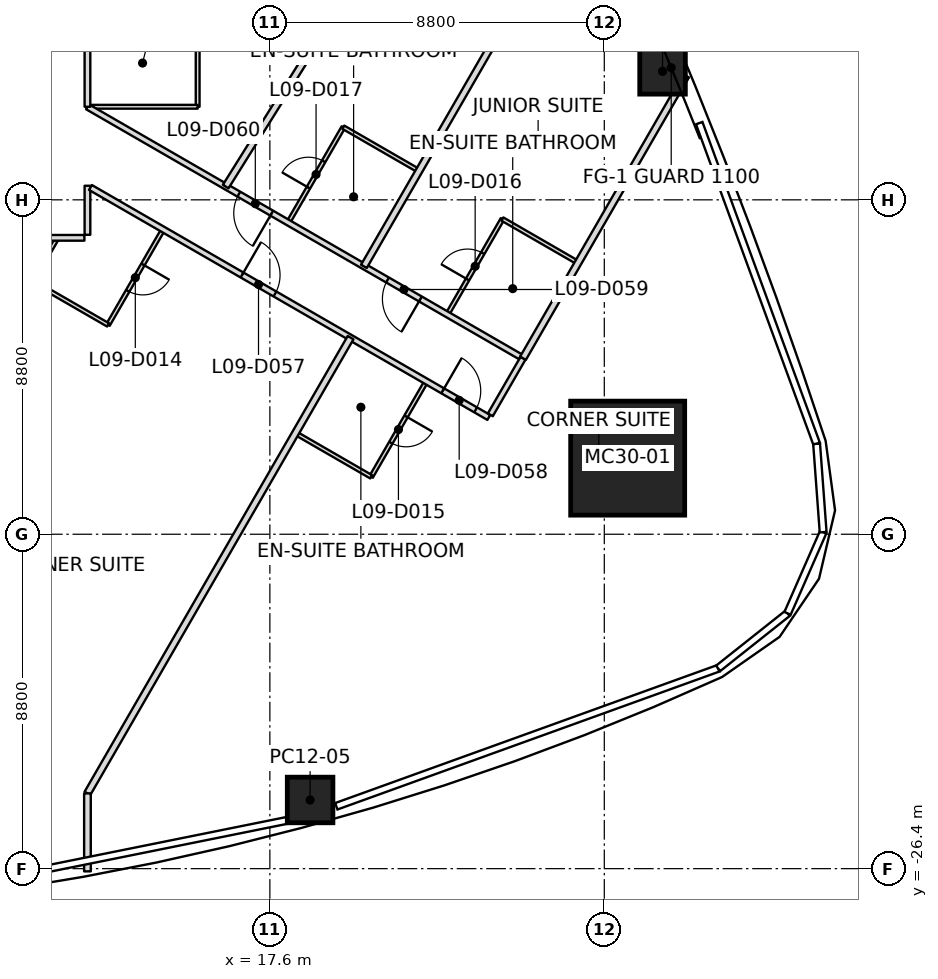
"""IFC4 building model, lengths in metres.
Left out: names, types, materials, properties, quantities, classifications, styles, units other than length and angle.
Written with IfcOpenShell. Run it as: python <this file> out.ifc"""

import sys

from ifc_helpers import new_model, si_unit, direction, frame, frame_2d, origin, origin_2d, place, context, subcontext, project, spatial, rectangle, extrude, clip, halfspace, element, fill, save


model = new_model("IFC4")
c1 = context("Model", 3, precision=1e-05, world=origin(), true_north=direction((0.0, 1.0)))
c2 = subcontext(c1, "Body", "Model", "MODEL_VIEW")
j1 = project(units=[si_unit("LENGTHUNIT", "METRE"), si_unit("PLANEANGLEUNIT", "RADIAN")], contexts=[c1])
p1 = place(None, origin())
s1 = spatial("IfcSite", under=j1, at=p1, CompositionType="ELEMENT")
p2 = place(p1, origin())
s2 = spatial("IfcBuilding", under=s1, at=p2, CompositionType="ELEMENT")
p3 = place(p2, frame((0.0, 0.0, 55.4)))
s3 = spatial("IfcBuildingStorey", under=s2, at=p3, CompositionType="ELEMENT", Elevation=55.4)
p4 = place(p3, frame((27.015, -15.597, 0.0), z_axis=(-0.030595822255, 0.017671724923, 0.999375607967), x_axis=(0.999531838243, 0.000540934199, 0.030591040022)))
e1 = element("IfcColumn", 1, at=p4, inside=s3, PredefinedType="COLUMN", context=c2, shape_type="SweptSolid", body=[
    extrude(rectangle(XDim=3.0, YDim=3.0, at=origin_2d()), origin(), (0.0, 0.0, 1.0), 3.702),
])
p5 = place(p3, frame((18.659, -24.593, 0.0), z_axis=(-0.018962740175, 0.175794991964, 0.984244144146), x_axis=(0.964231408406, 0.26352619053, -0.028491015209)))
e2 = element("IfcColumn", 2, at=p5, inside=s3, PredefinedType="COLUMN", context=c2, shape_type="SweptSolid", body=[
    clip(clip(extrude(rectangle(XDim=1.2, YDim=1.2, at=origin_2d()), origin(), (0.0, 0.0, 1.0), 3.76), halfspace(frame((0.0, 0.0, 0.001)), True)), halfspace(frame((0.0, 0.0, 3.759)), False)),
])
p6 = place(p3, frame((27.933, -5.418, 0.0), z_axis=(-0.019459371732, 0.011015983319, 0.999749959221), x_axis=(-0.381749906574, 0.924097828084, -0.017612863535)))
e3 = element("IfcColumn", 3, at=p6, inside=s3, PredefinedType="COLUMN", context=c2, shape_type="SweptSolid", body=[
    extrude(rectangle(XDim=1.2, YDim=1.2, at=origin_2d()), origin(), (0.0, 0.0, 1.0), 3.701),
])
p7 = place(p3, frame((19.724, -12.427, 0.0), z_axis=(0.0, 0.0, 1.0), x_axis=(-0.499994112739, -0.866028802769, 0.0)))
e4 = element("IfcWall", 4, at=p7, inside=s3, PredefinedType="PARTITIONING", context=c2, shape_type="SweptSolid", body=[
    extrude(rectangle(XDim=13.847, YDim=0.175, at=frame_2d((6.924, 0.0))), origin(), (0.0, 0.0, 1.0), 2.797),
])
p8 = place(p3, frame((12.8, -24.419, 0.0), z_axis=(0.0, 0.0, 1.0), x_axis=(0.0, -1.0, 0.0)))
e5 = element("IfcWall", 5, at=p8, inside=s3, PredefinedType="PARTITIONING", context=c2, shape_type="SweptSolid", body=[
    extrude(rectangle(XDim=2.052, YDim=0.175, at=frame_2d((1.026, 0.0))), origin(), (0.0, 0.0, 1.0), 2.934),
])
p9 = place(p3, frame((24.065, 3.75, 0.0), z_axis=(0.0, 0.0, 1.0), x_axis=(-0.530143821716, -0.847907735721, 0.0)))
e6 = element("IfcWall", 6, at=p9, inside=s3, PredefinedType="PARTITIONING", context=c2, shape_type="SweptSolid", body=[
    extrude(rectangle(XDim=14.389, YDim=0.175, at=frame_2d((7.194, 0.0))), origin(), (0.0, 0.0, 1.0), 2.947),
])
p10 = place(p3, frame((20.075, -10.551, 0.0), z_axis=(0.0, 0.0, 1.0), x_axis=(0.500001190589, 0.866024716396, 0.0)))
e7 = element("IfcWall", 7, at=p10, inside=s3, PredefinedType="PARTITIONING", context=c2, shape_type="SweptSolid", body=[
    extrude(rectangle(XDim=12.156, YDim=0.175, at=frame_2d((6.078, 0.0))), origin(), (0.0, 0.0, 1.0), 2.934),
])
p11 = place(p3, frame((24.261, -12.968, 0.0), z_axis=(0.0, 0.0, 1.0), x_axis=(0.500006467099, 0.866021669971, 0.0)))
e8 = element("IfcWall", 8, at=p11, inside=s3, PredefinedType="PARTITIONING", context=c2, shape_type="SweptSolid", body=[
    extrude(rectangle(XDim=8.582, YDim=0.175, at=frame_2d((4.291, 0.0))), origin(), (0.0, 0.0, 1.0), 2.934),
])
p12 = place(p3, frame((-12.72, -9.8, 0.0), z_axis=(0.0, 0.0, 1.0), x_axis=(1.0, 0.0, 0.0)))
e9 = element("IfcWall", 9, at=p12, inside=s3, PredefinedType="PARTITIONING", context=c2, shape_type="SweptSolid", body=[
    extrude(rectangle(XDim=25.44, YDim=0.15, at=frame_2d((12.72, 0.0))), origin(), (0.0, 0.0, 1.0), 2.797),
])
p13 = place(p12, frame((7.32, 0.0, 0.0)))
e10 = element("IfcOpeningElement", 10, at=p13, cuts=e9, PredefinedType="OPENING", context=c2, shape_type="SweptSolid", body=[
    extrude(rectangle(XDim=1.0, YDim=2.1, at=frame_2d((0.5, 1.05))), frame((0.0, 0.075, 0.0), z_axis=(0.0, -1.0, 0.0), x_axis=(1.0, 0.0, 0.0)), (0.0, 0.0, 1.0), 0.15),
])
p14 = place(p12, frame((11.52, 0.0, 0.0)))
e11 = element("IfcOpeningElement", 11, at=p14, cuts=e9, PredefinedType="OPENING", context=c2, shape_type="SweptSolid", body=[
    extrude(rectangle(XDim=1.0, YDim=2.1, at=frame_2d((0.5, 1.05))), frame((0.0, 0.075, 0.0), z_axis=(0.0, -1.0, 0.0), x_axis=(1.0, 0.0, 0.0)), (0.0, 0.0, 1.0), 0.15),
])
p15 = place(p12, frame((15.72, 0.0, 0.0)))
e12 = element("IfcOpeningElement", 12, at=p15, cuts=e9, PredefinedType="OPENING", context=c2, shape_type="SweptSolid", body=[
    extrude(rectangle(XDim=1.0, YDim=2.1, at=frame_2d((0.5, 1.05))), frame((0.0, 0.075, 0.0), z_axis=(0.0, -1.0, 0.0), x_axis=(1.0, 0.0, 0.0)), (0.0, 0.0, 1.0), 0.15),
])
p16 = place(p12, frame((19.92, 0.0, 0.0)))
e13 = element("IfcOpeningElement", 13, at=p16, cuts=e9, PredefinedType="OPENING", context=c2, shape_type="SweptSolid", body=[
    extrude(rectangle(XDim=1.0, YDim=2.1, at=frame_2d((0.5, 1.05))), frame((0.0, 0.075, 0.0), z_axis=(0.0, -1.0, 0.0), x_axis=(1.0, 0.0, 0.0)), (0.0, 0.0, 1.0), 0.15),
])
p17 = place(p3, frame((12.8, -9.72, 0.0), z_axis=(0.0, 0.0, 1.0), x_axis=(0.0, 1.0, 0.0)))
e14 = element("IfcWall", 14, at=p17, inside=s3, PredefinedType="PARTITIONING", context=c2, shape_type="SweptSolid", body=[
    extrude(rectangle(XDim=1.291, YDim=0.15, at=frame_2d((0.646, 0.0))), origin(), (0.0, 0.0, 1.0), 2.797),
])
p18 = place(p3, frame((12.879, -8.475, 0.0), z_axis=(0.0, 0.0, 1.0), x_axis=(0.866028715104, -0.499994264582, 0.0)))
e15 = element("IfcWall", 15, at=p18, inside=s3, PredefinedType="PARTITIONING", context=c2, shape_type="SweptSolid", body=[
    extrude(rectangle(XDim=12.103, YDim=0.15, at=frame_2d((6.052, 0.0))), origin(), (0.0, 0.0, 1.0), 2.797),
])
p19 = place(p18, frame((4.606, 0.0, 0.0)))
e16 = element("IfcOpeningElement", 16, at=p19, cuts=e15, PredefinedType="OPENING", context=c2, shape_type="SweptSolid", body=[
    extrude(rectangle(XDim=1.0, YDim=2.1, at=frame_2d((0.5, 1.05))), frame((0.0, 0.075, 0.0), z_axis=(0.0, -1.0, 0.0), x_axis=(1.0, 0.0, 0.0)), (0.0, 0.0, 1.0), 0.15),
])
p20 = place(p18, frame((10.703, 0.0, 0.0)))
e17 = element("IfcOpeningElement", 17, at=p20, cuts=e15, PredefinedType="OPENING", context=c2, shape_type="SweptSolid", body=[
    extrude(rectangle(XDim=1.0, YDim=2.1, at=frame_2d((0.5, 1.05))), frame((0.0, 0.075, 0.0), z_axis=(0.0, -1.0, 0.0), x_axis=(1.0, 0.0, 0.0)), (0.0, 0.0, 1.0), 0.15),
])
p21 = place(p3, frame((23.401, -14.458, 0.0), z_axis=(0.0, 0.0, 1.0), x_axis=(0.500062383118, 0.865989383878, 0.0)))
e18 = element("IfcWall", 18, at=p21, inside=s3, PredefinedType="PARTITIONING", context=c2, shape_type="SweptSolid", body=[
    extrude(rectangle(XDim=1.72, YDim=0.15, at=frame_2d((0.86, 0.0))), origin(), (0.0, 0.0, 1.0), 2.797),
])
p22 = place(p3, frame((24.192, -12.928, 0.0), z_axis=(0.0, 0.0, 1.0), x_axis=(-0.866018681408, 0.500011643316, 0.0)))
e19 = element("IfcWall", 19, at=p22, inside=s3, PredefinedType="PARTITIONING", context=c2, shape_type="SweptSolid", body=[
    extrude(rectangle(XDim=13.154, YDim=0.15, at=frame_2d((6.577, 0.0))), origin(), (0.0, 0.0, 1.0), 2.947),
])
p23 = place(p22, frame((3.037, 0.0, 0.0)))
e20 = element("IfcOpeningElement", 20, at=p23, cuts=e19, PredefinedType="OPENING", context=c2, shape_type="SweptSolid", body=[
    extrude(rectangle(XDim=1.0, YDim=2.1, at=frame_2d((0.5, 1.05))), frame((0.0, 0.075, 0.0), z_axis=(0.0, -1.0, 0.0), x_axis=(1.0, 0.0, 0.0)), (0.0, 0.0, 1.0), 0.15),
])
p24 = place(p22, frame((7.554, 0.0, 0.0)))
e21 = element("IfcOpeningElement", 21, at=p24, cuts=e19, PredefinedType="OPENING", context=c2, shape_type="SweptSolid", body=[
    extrude(rectangle(XDim=1.0, YDim=2.1, at=frame_2d((0.5, 1.05))), frame((0.0, 0.075, 0.0), z_axis=(0.0, -1.0, 0.0), x_axis=(1.0, 0.0, 0.0)), (0.0, 0.0, 1.0), 0.15),
])
p25 = place(p3, frame((12.8, -6.351, 0.0), z_axis=(0.0, 0.0, 1.0), x_axis=(0.0, 1.0, 0.0)))
e22 = element("IfcWall", 22, at=p25, inside=s3, PredefinedType="PARTITIONING", context=c2, shape_type="SweptSolid", body=[
    extrude(rectangle(XDim=16.071, YDim=0.15, at=frame_2d((8.035, 0.0))), origin(), (0.0, 0.0, 1.0), 3.0),
])
p26 = place(p25, frame((6.676, 0.0, 0.0)))
e23 = element("IfcOpeningElement", 23, at=p26, cuts=e22, PredefinedType="OPENING", context=c2, shape_type="SweptSolid", body=[
    extrude(rectangle(XDim=1.0, YDim=2.1, at=frame_2d((0.5, 1.05))), frame((0.0, 0.075, 0.0), z_axis=(0.0, -1.0, 0.0), x_axis=(1.0, 0.0, 0.0)), (0.0, 0.0, 1.0), 0.15),
])
p27 = place(p25, frame((14.751, 0.0, 0.0)))
e24 = element("IfcOpeningElement", 24, at=p27, cuts=e22, PredefinedType="OPENING", context=c2, shape_type="SweptSolid", body=[
    extrude(rectangle(XDim=1.0, YDim=2.1, at=frame_2d((0.5, 1.05))), frame((0.0, 0.075, 0.0), z_axis=(0.0, -1.0, 0.0), x_axis=(1.0, 0.0, 0.0)), (0.0, 0.0, 1.0), 0.15),
])
p28 = place(p3, frame((14.777, -9.605, 0.0), z_axis=(0.0, 0.0, 1.0), x_axis=(-0.499999802827, -0.866025517622, 0.0)))
e25 = element("IfcWall", 25, at=p28, inside=s3, PredefinedType="PARTITIONING", context=c2, shape_type="SweptSolid", body=[
    extrude(rectangle(XDim=2.87, YDim=0.1, at=frame_2d((1.435, 0.0))), origin(), (0.0, 0.0, 1.0), 2.797),
])
p29 = place(p28, frame((1.035, 0.0, 0.0)))
e26 = element("IfcOpeningElement", 26, at=p29, cuts=e25, PredefinedType="OPENING", context=c2, shape_type="SweptSolid", body=[
    extrude(rectangle(XDim=0.8, YDim=2.1, at=frame_2d((0.4, 1.05))), frame((0.0, 0.05, 0.0), z_axis=(0.0, -1.0, 0.0), x_axis=(1.0, 0.0, 0.0)), (0.0, 0.0, 1.0), 0.1),
])
p30 = place(p3, frame((13.342, -12.091, 0.0), z_axis=(0.0, 0.0, 1.0), x_axis=(-0.86602648383, 0.499998129301, 0.0)))
e27 = element("IfcWall", 27, at=p30, inside=s3, PredefinedType="PARTITIONING", context=c2, shape_type="SweptSolid", body=[
    extrude(rectangle(XDim=2.3, YDim=0.1, at=frame_2d((1.15, 0.0))), origin(), (0.0, 0.0, 1.0), 2.947),
])
p31 = place(p3, frame((11.35, -10.941, 0.0), z_axis=(0.0, 0.0, 1.0), x_axis=(0.499865263774, 0.866103179807, 0.0)))
e28 = element("IfcWall", 28, at=p31, inside=s3, PredefinedType="PARTITIONING", context=c2, shape_type="SweptSolid", body=[
    extrude(rectangle(XDim=1.282, YDim=0.1, at=frame_2d((0.641, 0.0))), origin(), (0.0, 0.0, 1.0), 3.0),
])
p32 = place(p3, frame((15.7, -4.051, 0.0), z_axis=(0.0, 0.0, 1.0), x_axis=(0.0, -1.0, 0.0)))
e29 = element("IfcWall", 29, at=p32, inside=s3, PredefinedType="PARTITIONING", context=c2, shape_type="SweptSolid", body=[
    extrude(rectangle(XDim=2.3, YDim=0.1, at=frame_2d((1.15, 0.0))), origin(), (0.0, 0.0, 1.0), 2.947),
])
p33 = place(p3, frame((15.7, -6.351, 0.0), z_axis=(0.0, 0.0, 1.0), x_axis=(-1.0, 0.0, 0.0)))
e30 = element("IfcWall", 30, at=p33, inside=s3, PredefinedType="PARTITIONING", context=c2, shape_type="SweptSolid", body=[
    extrude(rectangle(XDim=2.84, YDim=0.1, at=frame_2d((1.42, 0.0))), origin(), (0.0, 0.0, 1.0), 2.947),
])
p34 = place(p3, frame((18.098, -9.375, 0.0), z_axis=(0.0, 0.0, 1.0), x_axis=(0.499936001555, 0.866062350151, 0.0)))
e31 = element("IfcWall", 31, at=p34, inside=s3, PredefinedType="PARTITIONING", context=c2, shape_type="SweptSolid", body=[
    extrude(rectangle(XDim=2.87, YDim=0.1, at=frame_2d((1.435, 0.0))), origin(), (0.0, 0.0, 1.0), 2.947),
])
p35 = place(p34, frame((1.035, 0.0, 0.0)))
e32 = element("IfcOpeningElement", 32, at=p35, cuts=e31, PredefinedType="OPENING", context=c2, shape_type="SweptSolid", body=[
    extrude(rectangle(XDim=0.8, YDim=2.1, at=frame_2d((0.4, 1.05))), frame((0.0, 0.05, 0.0), z_axis=(0.0, -1.0, 0.0), x_axis=(1.0, 0.0, 0.0)), (0.0, 0.0, 1.0), 0.1),
])
p36 = place(p3, frame((19.533, -6.889, 0.0), z_axis=(0.0, 0.0, 1.0), x_axis=(0.866017224141, -0.500014167291, 0.0)))
e33 = element("IfcWall", 33, at=p36, inside=s3, PredefinedType="PARTITIONING", context=c2, shape_type="SweptSolid", body=[
    extrude(rectangle(XDim=2.27, YDim=0.1, at=frame_2d((1.135, 0.0))), origin(), (0.0, 0.0, 1.0), 2.947),
])
p37 = place(p3, frame((21.701, -13.603, 0.0), z_axis=(0.0, 0.0, 1.0), x_axis=(-0.500036638401, -0.866004249561, 0.0)))
e34 = element("IfcWall", 34, at=p37, inside=s3, PredefinedType="PARTITIONING", context=c2, shape_type="SweptSolid", body=[
    extrude(rectangle(XDim=2.87, YDim=0.1, at=frame_2d((1.435, 0.0))), origin(), (0.0, 0.0, 1.0), 3.0),
])
p38 = place(p37, frame((1.035, 0.0, 0.0)))
e35 = element("IfcOpeningElement", 35, at=p38, cuts=e34, PredefinedType="OPENING", context=c2, shape_type="SweptSolid", body=[
    extrude(rectangle(XDim=0.8, YDim=2.1, at=frame_2d((0.4, 1.05))), frame((0.0, 0.05, 0.0), z_axis=(0.0, -1.0, 0.0), x_axis=(1.0, 0.0, 0.0)), (0.0, 0.0, 1.0), 0.1),
])
p39 = place(p3, frame((20.266, -16.088, 0.0), z_axis=(0.0, 0.0, 1.0), x_axis=(-0.866017224141, 0.500014167291, 0.0)))
e36 = element("IfcWall", 36, at=p39, inside=s3, PredefinedType="PARTITIONING", context=c2, shape_type="SweptSolid", body=[
    extrude(rectangle(XDim=2.27, YDim=0.1, at=frame_2d((1.135, 0.0))), origin(), (0.0, 0.0, 1.0), 3.0),
])
p40 = place(p3, frame((22.284, -11.792, 0.0), z_axis=(0.0, 0.0, 1.0), x_axis=(0.499999802827, 0.866025517622, 0.0)))
e37 = element("IfcWall", 37, at=p40, inside=s3, PredefinedType="PARTITIONING", context=c2, shape_type="SweptSolid", body=[
    extrude(rectangle(XDim=2.87, YDim=0.1, at=frame_2d((1.435, 0.0))), origin(), (0.0, 0.0, 1.0), 3.0),
])
p41 = place(p40, frame((1.035, 0.0, 0.0)))
e38 = element("IfcOpeningElement", 38, at=p41, cuts=e37, PredefinedType="OPENING", context=c2, shape_type="SweptSolid", body=[
    extrude(rectangle(XDim=0.8, YDim=2.1, at=frame_2d((0.4, 1.05))), frame((0.0, 0.05, 0.0), z_axis=(0.0, -1.0, 0.0), x_axis=(1.0, 0.0, 0.0)), (0.0, 0.0, 1.0), 0.1),
])
p42 = place(p3, frame((23.719, -9.306, 0.0), z_axis=(0.0, 0.0, 1.0), x_axis=(0.866017224141, -0.500014167291, 0.0)))
e39 = element("IfcWall", 39, at=p42, inside=s3, PredefinedType="PARTITIONING", context=c2, shape_type="SweptSolid", body=[
    extrude(rectangle(XDim=2.27, YDim=0.1, at=frame_2d((1.135, 0.0))), origin(), (0.0, 0.0, 1.0), 3.0),
])
p43 = place(p19, origin())
e40 = element("IfcDoor", 40, at=p43, inside=s3, OperationType="SINGLE_SWING_RIGHT", PredefinedType="DOOR", context=c2, shape_type="SweptSolid", body=[
    extrude(rectangle(XDim=1.0, YDim=2.1, at=frame_2d((0.5, 1.05))), frame((0.0, 0.025, 0.0), z_axis=(0.0, -1.0, 0.0), x_axis=(1.0, 0.0, 0.0)), (0.0, 0.0, 1.0), 0.05),
])
fill(e16, e40)
p44 = place(p29, origin())
e41 = element("IfcDoor", 41, at=p44, inside=s3, OperationType="SINGLE_SWING_RIGHT", PredefinedType="DOOR", context=c2, shape_type="SweptSolid", body=[
    extrude(rectangle(XDim=0.8, YDim=2.1, at=frame_2d((0.4, 1.05))), frame((0.0, 0.025, 0.0), z_axis=(0.0, -1.0, 0.0), x_axis=(1.0, 0.0, 0.0)), (0.0, 0.0, 1.0), 0.05),
])
fill(e26, e41)
p45 = place(p20, origin())
e42 = element("IfcDoor", 42, at=p45, inside=s3, OperationType="SINGLE_SWING_RIGHT", PredefinedType="DOOR", context=c2, shape_type="SweptSolid", body=[
    extrude(rectangle(XDim=1.0, YDim=2.1, at=frame_2d((0.5, 1.05))), frame((0.0, 0.025, 0.0), z_axis=(0.0, -1.0, 0.0), x_axis=(1.0, 0.0, 0.0)), (0.0, 0.0, 1.0), 0.05),
])
fill(e17, e42)
p46 = place(p38, origin())
e43 = element("IfcDoor", 43, at=p46, inside=s3, OperationType="SINGLE_SWING_LEFT", PredefinedType="DOOR", context=c2, shape_type="SweptSolid", body=[
    extrude(rectangle(XDim=0.8, YDim=2.1, at=frame_2d((0.4, 1.05))), frame((0.0, 0.025, 0.0), z_axis=(0.0, -1.0, 0.0), x_axis=(1.0, 0.0, 0.0)), (0.0, 0.0, 1.0), 0.05),
])
fill(e35, e43)
p47 = place(p23, origin())
e44 = element("IfcDoor", 44, at=p47, inside=s3, OperationType="SINGLE_SWING_LEFT", PredefinedType="DOOR", context=c2, shape_type="SweptSolid", body=[
    extrude(rectangle(XDim=1.0, YDim=2.1, at=frame_2d((0.5, 1.05))), frame((0.0, 0.025, 0.0), z_axis=(0.0, -1.0, 0.0), x_axis=(1.0, 0.0, 0.0)), (0.0, 0.0, 1.0), 0.05),
])
fill(e20, e44)
p48 = place(p41, origin())
e45 = element("IfcDoor", 45, at=p48, inside=s3, OperationType="SINGLE_SWING_LEFT", PredefinedType="DOOR", context=c2, shape_type="SweptSolid", body=[
    extrude(rectangle(XDim=0.8, YDim=2.1, at=frame_2d((0.4, 1.05))), frame((0.0, 0.025, 0.0), z_axis=(0.0, -1.0, 0.0), x_axis=(1.0, 0.0, 0.0)), (0.0, 0.0, 1.0), 0.05),
])
fill(e38, e45)
p49 = place(p24, origin())
e46 = element("IfcDoor", 46, at=p49, inside=s3, OperationType="SINGLE_SWING_LEFT", PredefinedType="DOOR", context=c2, shape_type="SweptSolid", body=[
    extrude(rectangle(XDim=1.0, YDim=2.1, at=frame_2d((0.5, 1.05))), frame((0.0, 0.025, 0.0), z_axis=(0.0, -1.0, 0.0), x_axis=(1.0, 0.0, 0.0)), (0.0, 0.0, 1.0), 0.05),
])
fill(e21, e46)
p50 = place(p35, origin())
e47 = element("IfcDoor", 47, at=p50, inside=s3, OperationType="SINGLE_SWING_RIGHT", PredefinedType="DOOR", context=c2, shape_type="SweptSolid", body=[
    extrude(rectangle(XDim=0.8, YDim=2.1, at=frame_2d((0.4, 1.05))), frame((0.0, 0.025, 0.0), z_axis=(0.0, -1.0, 0.0), x_axis=(1.0, 0.0, 0.0)), (0.0, 0.0, 1.0), 0.05),
])
fill(e32, e47)
save(model, sys.argv[1])
